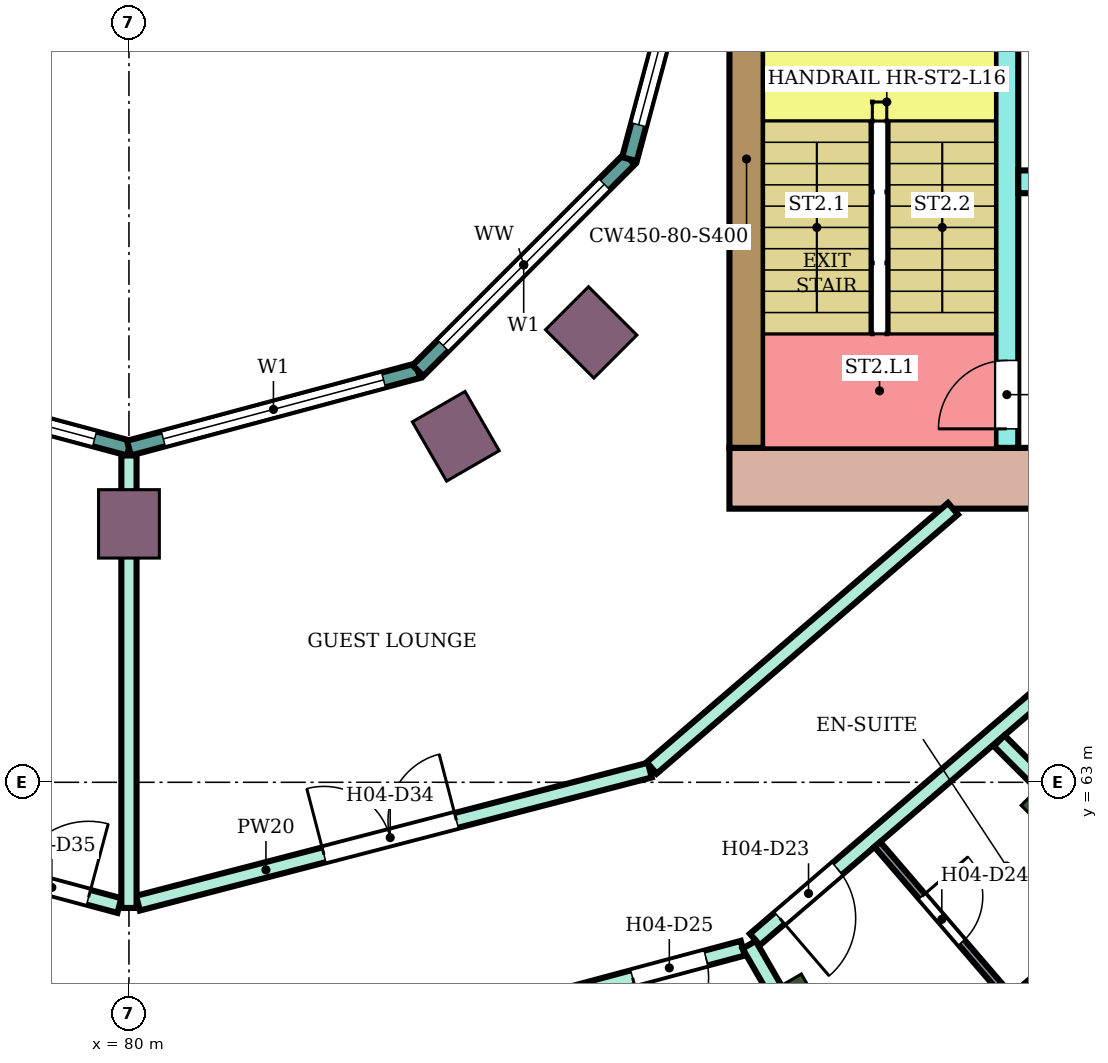
"""IFC4 building model, lengths in metres.
Left out: names, types, materials, properties, quantities, classifications, styles, units other than length and angle.
Written with IfcOpenShell. Run it as: python <this file> out.ifc"""

import sys

from ifc_helpers import new_model, si_unit, direction, frame, frame_2d, origin, origin_2d, place, context, subcontext, project, spatial, rectangle, extrude, element, fill, save


model = new_model("IFC4")
c1 = context("Model", 3, precision=1e-05, world=origin(), true_north=direction((0.0, 1.0)))
c2 = subcontext(c1, "Body", "Model", "MODEL_VIEW")
j1 = project(units=[si_unit("LENGTHUNIT", "METRE"), si_unit("PLANEANGLEUNIT", "RADIAN")], contexts=[c1])
p1 = place(None, origin())
s1 = spatial("IfcSite", under=j1, at=p1, CompositionType="ELEMENT")
p2 = place(p1, origin())
s2 = spatial("IfcBuilding", under=s1, at=p2, CompositionType="ELEMENT")
p3 = place(p2, frame((0.0, 0.0, 70.6)))
s3 = spatial("IfcBuildingStorey", under=s2, at=p3, CompositionType="ELEMENT", Elevation=70.6)
for number, where, z_axis, x_axis in (
    (1, (88.8, 59.758, 0.0), (0.0, 0.0, 1.0), (0.5, -0.866, 0.0)),
    (2, (92.445, 62.555, 0.0), (0.0, 0.0, 1.0), (0.707, -0.707, 0.0)),
):
    element("IfcColumn", number, at=place(p3, frame(where, z_axis=z_axis, x_axis=x_axis)), inside=s3, PredefinedType="COLUMN", context=c2, shape_type="SweptSolid", body=[
        extrude(rectangle(XDim=1.2, YDim=0.8, at=origin_2d()), origin(), (0.0, 0.0, 1.0), 3.8),
    ])
for number, where, z_axis, x_axis in (
    (3, (80.0, 66.4, 0.0), (0.0, 0.0, 1.0), (0.0, -1.0, 0.0)),
    (4, (84.3, 67.552, 0.0), (0.0, 0.0, 1.0), (0.5, -0.866, 0.0)),
    (5, (86.081, 68.919, 0.0), (0.0, 0.0, 1.0), (0.707, -0.707, 0.0)),
):
    element("IfcColumn", number, at=place(p3, frame(where, z_axis=z_axis, x_axis=x_axis)), inside=s3, PredefinedType="COLUMN", context=c2, shape_type="SweptSolid", body=[
        extrude(rectangle(XDim=0.9, YDim=0.8, at=origin_2d()), origin(), (0.0, 0.0, 1.0), 3.8),
    ])
p4 = place(p3, frame((87.9, 67.0, 0.0), z_axis=(0.0, 0.0, 1.0), x_axis=(1.0, 0.0, 0.0)))
e6 = element("IfcWall", 6, at=p4, inside=s3, PredefinedType="SHEAR", context=c2, shape_type="SweptSolid", body=[
    extrude(rectangle(XDim=14.7, YDim=0.8, at=frame_2d((7.35, 0.0))), origin(), (0.0, 0.0, 1.0), 3.4),
])
p5 = place(p4, frame((4.2, 0.0, 0.0)))
e7 = element("IfcOpeningElement", 7, at=p5, cuts=e6, PredefinedType="OPENING", context=c2, shape_type="SweptSolid", body=[
    extrude(rectangle(XDim=2.4, YDim=2.4, at=frame_2d((1.2, 1.2))), frame((0.0, 0.41, 0.0), z_axis=(0.0, -1.0, 0.0), x_axis=(1.0, 0.0, 0.0)), (0.0, 0.0, 1.0), 0.82),
])
p6 = place(p3, frame((88.125, 67.4, 0.0), z_axis=(0.0, 0.0, 1.0), x_axis=(0.0, 1.0, 0.0)))
e8 = element("IfcWall", 8, at=p6, inside=s3, PredefinedType="SHEAR", context=c2, shape_type="SweptSolid", body=[
    extrude(rectangle(XDim=7.6, YDim=0.45, at=frame_2d((3.8, 0.0))), origin(), (0.0, 0.0, 1.0), 3.4),
])
p7 = place(p3, frame((91.55, 67.4, 0.0), z_axis=(0.0, 0.0, 1.0), x_axis=(0.0, 1.0, 0.0)))
e9 = element("IfcWall", 9, at=p7, inside=s3, PredefinedType="SHEAR", context=c2, shape_type="SweptSolid", body=[
    extrude(rectangle(XDim=7.6, YDim=0.3, at=frame_2d((3.8, 0.0))), origin(), (0.0, 0.0, 1.0), 3.4),
])
p8 = place(p7, frame((0.25, 0.0, 0.0)))
e10 = element("IfcOpeningElement", 10, at=p8, cuts=e9, PredefinedType="OPENING", context=c2, shape_type="SweptSolid", body=[
    extrude(rectangle(XDim=0.9, YDim=2.1, at=frame_2d((0.45, 1.05))), frame((0.0, 0.16, 0.0), z_axis=(0.0, -1.0, 0.0), x_axis=(1.0, 0.0, 0.0)), (0.0, 0.0, 1.0), 0.32),
])
p9 = place(p3, frame((91.7, 70.9, 0.0), z_axis=(0.0, 0.0, 1.0), x_axis=(1.0, 0.0, 0.0)))
e11 = element("IfcWall", 11, at=p9, inside=s3, PredefinedType="SHEAR", context=c2, shape_type="SweptSolid", body=[
    extrude(rectangle(XDim=10.9, YDim=0.3, at=frame_2d((5.45, 0.0))), origin(), (0.0, 0.0, 1.0), 3.4),
])
p10 = place(p9, frame((0.4, 0.0, 0.0)))
e12 = element("IfcOpeningElement", 12, at=p10, cuts=e11, PredefinedType="OPENING", context=c2, shape_type="SweptSolid", body=[
    extrude(rectangle(XDim=1.4, YDim=2.1, at=frame_2d((0.7, 1.05))), frame((0.0, 0.16, 0.0), z_axis=(0.0, -1.0, 0.0), x_axis=(1.0, 0.0, 0.0)), (0.0, 0.0, 1.0), 0.32),
])
p11 = place(p9, frame((5.4, 0.0, 0.0)))
e13 = element("IfcOpeningElement", 13, at=p11, cuts=e11, PredefinedType="OPENING", context=c2, shape_type="SweptSolid", body=[
    extrude(rectangle(XDim=1.4, YDim=2.1, at=frame_2d((0.7, 1.05))), frame((0.0, 0.16, 0.0), z_axis=(0.0, -1.0, 0.0), x_axis=(1.0, 0.0, 0.0)), (0.0, 0.0, 1.0), 0.32),
])
p12 = place(p9, frame((8.1, 0.0, 0.0)))
e14 = element("IfcOpeningElement", 14, at=p12, cuts=e11, PredefinedType="OPENING", context=c2, shape_type="SweptSolid", body=[
    extrude(rectangle(XDim=1.0, YDim=2.1, at=frame_2d((0.5, 1.05))), frame((0.0, 0.16, 0.0), z_axis=(0.0, -1.0, 0.0), x_axis=(1.0, 0.0, 0.0)), (0.0, 0.0, 1.0), 0.32),
])
p13 = place(p3, frame((76.198, 68.415, 0.0), z_axis=(0.0, 0.0, 1.0), x_axis=(0.965933654434, -0.258789828301, 0.0)))
e15 = element("IfcWall", 15, at=p13, inside=s3, PredefinedType="NOTDEFINED", context=c2, shape_type="SweptSolid", body=[
    extrude(rectangle(XDim=3.936, YDim=0.2, at=frame_2d((1.968, 0.0))), origin(), (0.0, 0.0, 1.0), 3.8),
])
p14 = place(p13, frame((0.468, 0.0, 0.9)))
e16 = element("IfcOpeningElement", 16, at=p14, cuts=e15, PredefinedType="OPENING", context=c2, shape_type="SweptSolid", body=[
    extrude(rectangle(XDim=3.0, YDim=2.3, at=frame_2d((1.5, 1.15))), frame((0.0, 0.11, 0.0), z_axis=(0.0, -1.0, 0.0), x_axis=(1.0, 0.0, 0.0)), (0.0, 0.0, 1.0), 0.22),
])
p15 = place(p3, frame((80.0, 67.396, 0.0), z_axis=(0.0, 0.0, 1.0), x_axis=(0.965933654434, 0.258789828301, 0.0)))
e17 = element("IfcWall", 17, at=p15, inside=s3, PredefinedType="NOTDEFINED", context=c2, shape_type="SweptSolid", body=[
    extrude(rectangle(XDim=3.936, YDim=0.2, at=frame_2d((1.968, 0.0))), origin(), (0.0, 0.0, 1.0), 3.8),
])
p16 = place(p15, frame((0.468, 0.0, 0.9)))
e18 = element("IfcOpeningElement", 18, at=p16, cuts=e17, PredefinedType="OPENING", context=c2, shape_type="SweptSolid", body=[
    extrude(rectangle(XDim=3.0, YDim=2.3, at=frame_2d((1.5, 1.15))), frame((0.0, 0.11, 0.0), z_axis=(0.0, -1.0, 0.0), x_axis=(1.0, 0.0, 0.0)), (0.0, 0.0, 1.0), 0.22),
])
p17 = place(p3, frame((83.802, 68.415, 0.0), z_axis=(0.0, 0.0, 1.0), x_axis=(0.707106781187, 0.707106781187, 0.0)))
e19 = element("IfcWall", 19, at=p17, inside=s3, PredefinedType="NOTDEFINED", context=c2, shape_type="SweptSolid", body=[
    extrude(rectangle(XDim=3.936, YDim=0.2, at=frame_2d((1.968, 0.0))), origin(), (0.0, 0.0, 1.0), 3.8),
])
p18 = place(p17, frame((0.468, 0.0, 0.9)))
e20 = element("IfcOpeningElement", 20, at=p18, cuts=e19, PredefinedType="OPENING", context=c2, shape_type="SweptSolid", body=[
    extrude(rectangle(XDim=3.0, YDim=2.3, at=frame_2d((1.5, 1.15))), frame((0.0, 0.11, 0.0), z_axis=(0.0, -1.0, 0.0), x_axis=(1.0, 0.0, 0.0)), (0.0, 0.0, 1.0), 0.22),
])
p19 = place(p3, frame((86.585, 71.198, 0.0), z_axis=(0.0, 0.0, 1.0), x_axis=(0.258789828301, 0.965933654434, 0.0)))
e21 = element("IfcWall", 21, at=p19, inside=s3, PredefinedType="NOTDEFINED", context=c2, shape_type="SweptSolid", body=[
    extrude(rectangle(XDim=3.936, YDim=0.2, at=frame_2d((1.968, 0.0))), origin(), (0.0, 0.0, 1.0), 3.8),
])
p20 = place(p19, frame((0.468, 0.0, 0.9)))
e22 = element("IfcOpeningElement", 22, at=p20, cuts=e21, PredefinedType="OPENING", context=c2, shape_type="SweptSolid", body=[
    extrude(rectangle(XDim=3.0, YDim=2.3, at=frame_2d((1.5, 1.15))), frame((0.0, 0.11, 0.0), z_axis=(0.0, -1.0, 0.0), x_axis=(1.0, 0.0, 0.0)), (0.0, 0.0, 1.0), 0.22),
])
p21 = place(p3, frame((71.877, 60.832, 0.0), z_axis=(0.0, 0.0, 1.0), x_axis=(0.965852509869, -0.259092510851, 0.0)))
e23 = element("IfcWall", 23, at=p21, inside=s3, PredefinedType="PARTITIONING", context=c2, shape_type="SweptSolid", body=[
    extrude(rectangle(XDim=8.32, YDim=0.2, at=frame_2d((4.16, 0.0))), origin(), (0.0, 0.0, 1.0), 3.35),
])
p22 = place(p21, frame((6.86, 0.0, 0.0)))
e24 = element("IfcOpeningElement", 24, at=p22, cuts=e23, PredefinedType="OPENING", context=c2, shape_type="SweptSolid", body=[
    extrude(rectangle(XDim=1.0, YDim=2.1, at=frame_2d((0.5, 1.05))), frame((0.0, 0.11, 0.0), z_axis=(0.0, -1.0, 0.0), x_axis=(1.0, 0.0, 0.0)), (0.0, 0.0, 1.0), 0.22),
])
p23 = place(p21, frame((0.55, 0.0, 0.0)))
e25 = element("IfcOpeningElement", 25, at=p23, cuts=e23, PredefinedType="OPENING", context=c2, shape_type="SweptSolid", body=[
    extrude(rectangle(XDim=1.0, YDim=2.1, at=frame_2d((0.5, 1.05))), frame((0.0, 0.11, 0.0), z_axis=(0.0, -1.0, 0.0), x_axis=(1.0, 0.0, 0.0)), (0.0, 0.0, 1.0), 0.22),
])
p24 = place(p3, frame((73.297, 63.143, 0.0), z_axis=(0.0, 0.0, 1.0), x_axis=(0.965859030528, -0.25906820173, 0.0)))
e26 = element("IfcWall", 26, at=p24, inside=s3, PredefinedType="PARTITIONING", context=c2, shape_type="SweptSolid", body=[
    extrude(rectangle(XDim=6.81, YDim=0.2, at=frame_2d((3.405, 0.0))), origin(), (0.0, 0.0, 1.0), 3.35),
])
p25 = place(p24, frame((5.39, 0.0, 0.0)))
e27 = element("IfcOpeningElement", 27, at=p25, cuts=e26, PredefinedType="OPENING", context=c2, shape_type="SweptSolid", body=[
    extrude(rectangle(XDim=1.0, YDim=2.1, at=frame_2d((0.5, 1.05))), frame((0.0, 0.11, 0.0), z_axis=(0.0, -1.0, 0.0), x_axis=(1.0, 0.0, 0.0)), (0.0, 0.0, 1.0), 0.22),
])
p26 = place(p3, frame((80.119, 61.41, 0.0), z_axis=(0.0, 0.0, 1.0), x_axis=(0.967823361235, 0.251630565408, 0.0)))
e28 = element("IfcWall", 28, at=p26, inside=s3, PredefinedType="PARTITIONING", context=c2, shape_type="SweptSolid", body=[
    extrude(rectangle(XDim=6.958, YDim=0.2, at=frame_2d((3.479, 0.0))), origin(), (0.0, 0.0, 1.0), 3.35),
])
p27 = place(p26, frame((2.529, 0.0, 0.0)))
e29 = element("IfcOpeningElement", 29, at=p27, cuts=e28, PredefinedType="OPENING", context=c2, shape_type="SweptSolid", body=[
    extrude(rectangle(XDim=1.8, YDim=2.1, at=frame_2d((0.9, 1.05))), frame((0.0, 0.11, 0.0), z_axis=(0.0, -1.0, 0.0), x_axis=(1.0, 0.0, 0.0)), (0.0, 0.0, 1.0), 0.22),
])
p28 = place(p3, frame((80.0, 58.655, 0.0), z_axis=(0.0, 0.0, 1.0), x_axis=(0.965974635626, 0.258636817424, 0.0)))
e30 = element("IfcWall", 30, at=p28, inside=s3, PredefinedType="PARTITIONING", context=c2, shape_type="SweptSolid", body=[
    extrude(rectangle(XDim=8.36, YDim=0.2, at=frame_2d((4.18, 0.0))), origin(), (0.0, 0.0, 1.0), 3.35),
])
p29 = place(p28, frame((6.86, 0.0, 0.0)))
e31 = element("IfcOpeningElement", 31, at=p29, cuts=e30, PredefinedType="OPENING", context=c2, shape_type="SweptSolid", body=[
    extrude(rectangle(XDim=1.0, YDim=2.1, at=frame_2d((0.5, 1.05))), frame((0.0, 0.11, 0.0), z_axis=(0.0, -1.0, 0.0), x_axis=(1.0, 0.0, 0.0)), (0.0, 0.0, 1.0), 0.22),
])
p30 = place(p28, frame((0.55, 0.0, 0.0)))
e32 = element("IfcOpeningElement", 32, at=p30, cuts=e30, PredefinedType="OPENING", context=c2, shape_type="SweptSolid", body=[
    extrude(rectangle(XDim=1.0, YDim=2.1, at=frame_2d((0.5, 1.05))), frame((0.0, 0.11, 0.0), z_axis=(0.0, -1.0, 0.0), x_axis=(1.0, 0.0, 0.0)), (0.0, 0.0, 1.0), 0.22),
])
p31 = place(p3, frame((80.0, 61.347, 0.0), z_axis=(0.0, 0.0, 1.0), x_axis=(0.0, 1.0, 0.0)))
e33 = element("IfcWall", 33, at=p31, inside=s3, PredefinedType="PARTITIONING", context=c2, shape_type="SweptSolid", body=[
    extrude(rectangle(XDim=5.953, YDim=0.2, at=frame_2d((2.977, 0.0))), origin(), (0.0, 0.0, 1.0), 3.35),
])
p32 = place(p3, frame((86.877, 63.189, 0.0), z_axis=(0.0, 0.0, 1.0), x_axis=(0.758088707506, 0.652151448325, 0.0)))
e34 = element("IfcWall", 34, at=p32, inside=s3, PredefinedType="PARTITIONING", context=c2, shape_type="SweptSolid", body=[
    extrude(rectangle(XDim=5.229, YDim=0.2, at=frame_2d((2.615, 0.0))), origin(), (0.0, 0.0, 1.0), 3.35),
])
p33 = place(p3, frame((88.235, 60.931, 0.0), z_axis=(0.0, 0.0, 1.0), x_axis=(0.758799498714, 0.651324282329, 0.0)))
e35 = element("IfcWall", 35, at=p33, inside=s3, PredefinedType="PARTITIONING", context=c2, shape_type="SweptSolid", body=[
    extrude(rectangle(XDim=6.186, YDim=0.2, at=frame_2d((3.093, 0.0))), origin(), (0.0, 0.0, 1.0), 3.35),
])
p34 = place(p33, frame((0.43, 0.0, 0.0)))
e36 = element("IfcOpeningElement", 36, at=p34, cuts=e35, PredefinedType="OPENING", context=c2, shape_type="SweptSolid", body=[
    extrude(rectangle(XDim=1.0, YDim=2.1, at=frame_2d((0.5, 1.05))), frame((0.0, 0.11, 0.0), z_axis=(0.0, -1.0, 0.0), x_axis=(1.0, 0.0, 0.0)), (0.0, 0.0, 1.0), 0.22),
])
p35 = place(p3, frame((88.159, 60.863, 0.0), z_axis=(0.0, 0.0, 1.0), x_axis=(0.499935840196, -0.866062443296, 0.0)))
e37 = element("IfcWall", 37, at=p35, inside=s3, PredefinedType="PARTITIONING", context=c2, shape_type="SweptSolid", body=[
    extrude(rectangle(XDim=9.475, YDim=0.2, at=frame_2d((4.737, 0.0))), origin(), (0.0, 0.0, 1.0), 3.35),
])
p36 = place(p3, frame((91.448, 63.547, 0.0), z_axis=(0.0, 0.0, 1.0), x_axis=(0.706984810649, -0.707228730688, 0.0)))
e38 = element("IfcWall", 38, at=p36, inside=s3, PredefinedType="PARTITIONING", context=c2, shape_type="SweptSolid", body=[
    extrude(rectangle(XDim=7.006, YDim=0.2, at=frame_2d((3.503, 0.0))), origin(), (0.0, 0.0, 1.0), 3.35),
])
p37 = place(p3, frame((89.846, 62.182, 0.0), z_axis=(0.0, 0.0, 1.0), x_axis=(0.652095405055, -0.758136915541, 0.0)))
e39 = element("IfcWall", 39, at=p37, inside=s3, PredefinedType="PARTITIONING", context=c2, shape_type="SweptSolid", body=[
    extrude(rectangle(XDim=2.65, YDim=0.1, at=frame_2d((1.325, 0.0))), origin(), (0.0, 0.0, 1.0), 3.35),
])
p38 = place(p37, frame((0.9, 0.0, 0.0)))
e40 = element("IfcOpeningElement", 40, at=p38, cuts=e39, PredefinedType="OPENING", context=c2, shape_type="SweptSolid", body=[
    extrude(rectangle(XDim=0.8, YDim=2.1, at=frame_2d((0.4, 1.05))), frame((0.0, 0.06, 0.0), z_axis=(0.0, -1.0, 0.0), x_axis=(1.0, 0.0, 0.0)), (0.0, 0.0, 1.0), 0.12),
])
p39 = place(p3, frame((91.607, 60.135, 0.0), z_axis=(0.0, 0.0, 1.0), x_axis=(0.758121792225, 0.65211298726, 0.0)))
e41 = element("IfcWall", 41, at=p39, inside=s3, PredefinedType="PARTITIONING", context=c2, shape_type="SweptSolid", body=[
    extrude(rectangle(XDim=4.15, YDim=0.1, at=frame_2d((2.075, 0.0))), origin(), (0.0, 0.0, 1.0), 3.35),
])
p40 = place(p14, origin())
e42 = element("IfcWindow", 42, at=p40, inside=s3, PartitioningType="SINGLE_PANEL", PredefinedType="WINDOW", context=c2, shape_type="SweptSolid", body=[
    extrude(rectangle(XDim=3.0, YDim=2.3, at=frame_2d((1.5, 1.15))), frame((0.0, 0.03, 0.0), z_axis=(0.0, -1.0, 0.0), x_axis=(1.0, 0.0, 0.0)), (0.0, 0.0, 1.0), 0.06),
])
fill(e16, e42)
p41 = place(p16, origin())
e43 = element("IfcWindow", 43, at=p41, inside=s3, PartitioningType="SINGLE_PANEL", PredefinedType="WINDOW", context=c2, shape_type="SweptSolid", body=[
    extrude(rectangle(XDim=3.0, YDim=2.3, at=frame_2d((1.5, 1.15))), frame((0.0, 0.03, 0.0), z_axis=(0.0, -1.0, 0.0), x_axis=(1.0, 0.0, 0.0)), (0.0, 0.0, 1.0), 0.06),
])
fill(e18, e43)
p42 = place(p18, origin())
e44 = element("IfcWindow", 44, at=p42, inside=s3, PartitioningType="SINGLE_PANEL", PredefinedType="WINDOW", context=c2, shape_type="SweptSolid", body=[
    extrude(rectangle(XDim=3.0, YDim=2.3, at=frame_2d((1.5, 1.15))), frame((0.0, 0.03, 0.0), z_axis=(0.0, -1.0, 0.0), x_axis=(1.0, 0.0, 0.0)), (0.0, 0.0, 1.0), 0.06),
])
fill(e20, e44)
p43 = place(p20, origin())
e45 = element("IfcWindow", 45, at=p43, inside=s3, PartitioningType="SINGLE_PANEL", PredefinedType="WINDOW", context=c2, shape_type="SweptSolid", body=[
    extrude(rectangle(XDim=3.0, YDim=2.3, at=frame_2d((1.5, 1.15))), frame((0.0, 0.03, 0.0), z_axis=(0.0, -1.0, 0.0), x_axis=(1.0, 0.0, 0.0)), (0.0, 0.0, 1.0), 0.06),
])
fill(e22, e45)
p44 = place(p34, frame((1.0, 0.0, 0.0), z_axis=(0.0, 0.0, 1.0), x_axis=(-1.0, 0.0, 0.0)))
e46 = element("IfcDoor", 46, at=p44, inside=s3, OperationType="SINGLE_SWING_RIGHT", PredefinedType="DOOR", context=c2, shape_type="SweptSolid", body=[
    extrude(rectangle(XDim=1.0, YDim=2.1, at=frame_2d((0.5, 1.05))), frame((0.0, 0.025, 0.0), z_axis=(0.0, -1.0, 0.0), x_axis=(1.0, 0.0, 0.0)), (0.0, 0.0, 1.0), 0.05),
])
fill(e36, e46)
p45 = place(p38, origin())
e47 = element("IfcDoor", 47, at=p45, inside=s3, OperationType="SINGLE_SWING_LEFT", PredefinedType="DOOR", context=c2, shape_type="SweptSolid", body=[
    extrude(rectangle(XDim=0.8, YDim=2.1, at=frame_2d((0.4, 1.05))), frame((0.0, 0.025, 0.0), z_axis=(0.0, -1.0, 0.0), x_axis=(1.0, 0.0, 0.0)), (0.0, 0.0, 1.0), 0.05),
])
fill(e40, e47)
p46 = place(p29, frame((1.0, 0.0, 0.0), z_axis=(0.0, 0.0, 1.0), x_axis=(-1.0, 0.0, 0.0)))
e48 = element("IfcDoor", 48, at=p46, inside=s3, OperationType="SINGLE_SWING_RIGHT", PredefinedType="DOOR", context=c2, shape_type="SweptSolid", body=[
    extrude(rectangle(XDim=1.0, YDim=2.1, at=frame_2d((0.5, 1.05))), frame((0.0, 0.025, 0.0), z_axis=(0.0, -1.0, 0.0), x_axis=(1.0, 0.0, 0.0)), (0.0, 0.0, 1.0), 0.05),
])
fill(e31, e48)
p47 = place(p27, origin())
e49 = element("IfcDoor", 49, at=p47, inside=s3, OperationType="DOUBLE_DOOR_SINGLE_SWING", PredefinedType="DOOR", context=c2, shape_type="SweptSolid", body=[
    extrude(rectangle(XDim=1.8, YDim=2.1, at=frame_2d((0.9, 1.05))), frame((0.0, 0.025, 0.0), z_axis=(0.0, -1.0, 0.0), x_axis=(1.0, 0.0, 0.0)), (0.0, 0.0, 1.0), 0.05),
])
fill(e29, e49)
p48 = place(p25, origin())
e50 = element("IfcDoor", 50, at=p48, inside=s3, OperationType="SINGLE_SWING_RIGHT", PredefinedType="DOOR", context=c2, shape_type="SweptSolid", body=[
    extrude(rectangle(XDim=1.0, YDim=2.1, at=frame_2d((0.5, 1.05))), frame((0.0, 0.025, 0.0), z_axis=(0.0, -1.0, 0.0), x_axis=(1.0, 0.0, 0.0)), (0.0, 0.0, 1.0), 0.05),
])
fill(e27, e50)
p49 = place(p8, origin())
e51 = element("IfcDoor", 51, at=p49, inside=s3, OperationType="SINGLE_SWING_LEFT", PredefinedType="DOOR", context=c2, shape_type="SweptSolid", body=[
    extrude(rectangle(XDim=0.9, YDim=2.1, at=frame_2d((0.45, 1.05))), frame((0.0, 0.025, 0.0), z_axis=(0.0, -1.0, 0.0), x_axis=(1.0, 0.0, 0.0)), (0.0, 0.0, 1.0), 0.05),
])
fill(e10, e51)
save(model, sys.argv[1])
